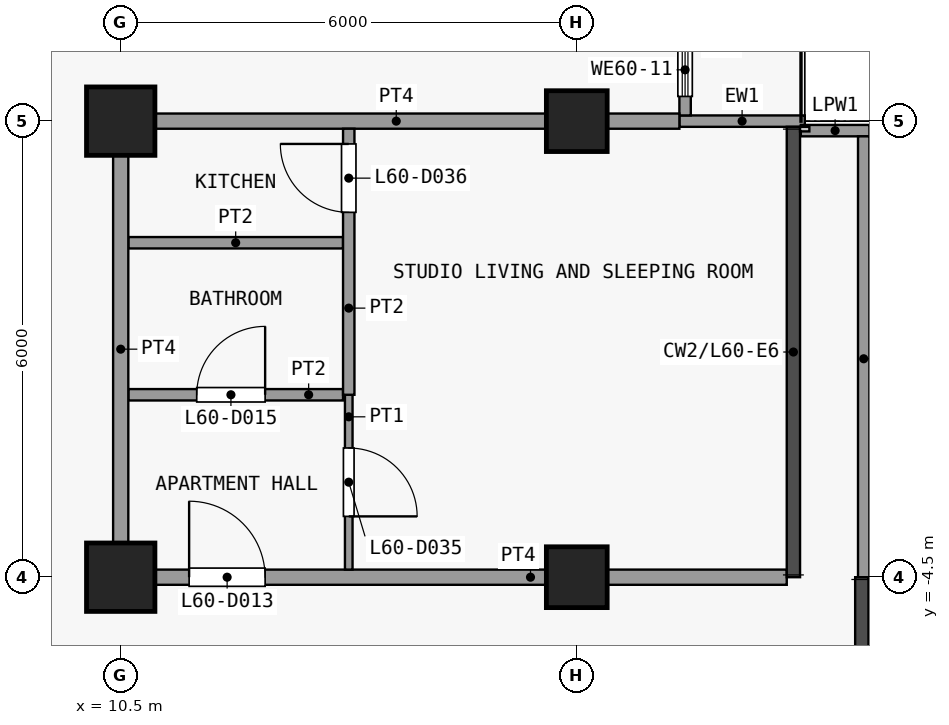
"""IFC4 building model, lengths in metres.
Left out: names, types, materials, properties, quantities, classifications, styles, units other than length and angle.
Written with IfcOpenShell. Run it as: python <this file> out.ifc"""

import sys

from ifc_helpers import new_model, si_unit, direction, frame, frame_2d, origin, origin_2d, place, context, subcontext, project, spatial, rectangle, extrude, element, fill, save


model = new_model("IFC4")
c1 = context("Model", 3, precision=1e-05, world=origin(), true_north=direction((0.0, 1.0)))
c2 = subcontext(c1, "Body", "Model", "MODEL_VIEW")
j1 = project(units=[si_unit("LENGTHUNIT", "METRE"), si_unit("PLANEANGLEUNIT", "RADIAN")], contexts=[c1])
p1 = place(None, origin())
s1 = spatial("IfcSite", under=j1, at=p1, CompositionType="ELEMENT")
p2 = place(p1, origin())
s2 = spatial("IfcBuilding", under=s1, at=p2, CompositionType="ELEMENT")
p3 = place(p2, frame((0.0, 0.0, 237.5)))
s3 = spatial("IfcBuildingStorey", under=s2, at=p3, CompositionType="ELEMENT", Elevation=237.5)
for number, where, z_axis, x_axis in (
    (1, (10.5, -4.5, 0.0), (0.0, 0.0, 1.0), (1.0, 0.0, 0.0)),
    (2, (10.5, 1.5, 0.0), (0.0, 0.0, 1.0), (1.0, 0.0, 0.0)),
):
    element("IfcColumn", number, at=place(p3, frame(where, z_axis=z_axis, x_axis=x_axis)), inside=s3, PredefinedType="COLUMN", context=c2, shape_type="SweptSolid", body=[
        extrude(rectangle(XDim=0.9, YDim=0.9, at=origin_2d()), origin(), (0.0, 0.0, 1.0), 3.6),
    ])
for number, where, z_axis, x_axis in (
    (3, (16.5, -4.5, 0.0), (0.0, 0.0, 1.0), (1.0, 0.0, 0.0)),
    (4, (16.5, 1.5, 0.0), (0.0, 0.0, 1.0), (1.0, 0.0, 0.0)),
):
    element("IfcColumn", number, at=place(p3, frame(where, z_axis=z_axis, x_axis=x_axis)), inside=s3, PredefinedType="COLUMN", context=c2, shape_type="SweptSolid", body=[
        extrude(rectangle(XDim=0.8, YDim=0.8, at=origin_2d()), origin(), (0.0, 0.0, 1.0), 3.6),
    ])
p4 = place(p3, frame((17.85, 1.5, 0.0), z_axis=(0.0, 0.0, 1.0), x_axis=(1.0, 0.0, 0.0)))
e5 = element("IfcWall", 5, at=p4, inside=s3, PredefinedType="SOLIDWALL", context=c2, shape_type="SweptSolid", body=[
    extrude(rectangle(XDim=1.65, YDim=0.15, at=frame_2d((0.825, 0.0))), origin(), (0.0, 0.0, 1.0), 3.3),
])
p5 = place(p3, frame((17.925, 7.425, 0.0), z_axis=(0.0, 0.0, 1.0), x_axis=(0.0, -1.0, 0.0)))
e6 = element("IfcWall", 6, at=p5, inside=s3, PredefinedType="SOLIDWALL", context=c2, shape_type="SweptSolid", body=[
    extrude(rectangle(XDim=5.85, YDim=0.15, at=frame_2d((2.925, 0.0))), origin(), (0.0, 0.0, 1.0), 3.3),
])
p6 = place(p5, frame((3.45, 0.0, 0.0)))
e7 = element("IfcOpeningElement", 7, at=p6, cuts=e6, PredefinedType="OPENING", context=c2, shape_type="SweptSolid", body=[
    extrude(rectangle(XDim=1.2, YDim=2.4, at=frame_2d((0.6, 1.2))), frame((0.0, 0.085, 0.0), z_axis=(0.0, -1.0, 0.0), x_axis=(1.0, 0.0, 0.0)), (0.0, 0.0, 1.0), 0.17),
])
p7 = place(p5, frame((4.9, 0.0, 0.9)))
e8 = element("IfcOpeningElement", 8, at=p7, cuts=e6, PredefinedType="OPENING", context=c2, shape_type="SweptSolid", body=[
    extrude(rectangle(XDim=0.7, YDim=2.1, at=frame_2d((0.35, 1.05))), frame((0.0, 0.085, 0.0), z_axis=(0.0, -1.0, 0.0), x_axis=(1.0, 0.0, 0.0)), (0.0, 0.0, 1.0), 0.17),
])
p8 = place(p5, frame((0.825, 0.0, 0.9)))
e9 = element("IfcOpeningElement", 9, at=p8, cuts=e6, PredefinedType="OPENING", context=c2, shape_type="SweptSolid", body=[
    extrude(rectangle(XDim=1.8, YDim=2.1, at=frame_2d((0.9, 1.05))), frame((0.0, 0.085, 0.0), z_axis=(0.0, -1.0, 0.0), x_axis=(1.0, 0.0, 0.0)), (0.0, 0.0, 1.0), 0.17),
])
p9 = place(p3, frame((19.448, 1.375, 0.0), z_axis=(0.0, 0.0, 1.0), x_axis=(1.0, 0.0, 0.0)))
e10 = element("IfcWall", 10, at=p9, inside=s3, PredefinedType="PARAPET", context=c2, shape_type="SweptSolid", body=[
    extrude(rectangle(XDim=0.903, YDim=0.15, at=frame_2d((0.451, 0.0))), origin(), (0.0, 0.0, 1.0), 1.15),
])
p10 = place(p3, frame((20.275, 1.3, 0.0), z_axis=(0.0, 0.0, 1.0), x_axis=(0.0, -1.0, 0.0)))
e11 = element("IfcWall", 11, at=p10, inside=s3, PredefinedType="PARAPET", context=c2, shape_type="SweptSolid", body=[
    extrude(rectangle(XDim=5.853, YDim=0.15, at=frame_2d((2.926, 0.0))), origin(), (0.0, 0.0, 1.0), 1.15),
])
p11 = place(p3, frame((10.4, -4.5, 0.0), z_axis=(0.0, 0.0, 1.0), x_axis=(1.0, 0.0, 0.0)))
e12 = element("IfcWall", 12, at=p11, inside=s3, PredefinedType="PARTITIONING", context=c2, shape_type="SweptSolid", body=[
    extrude(rectangle(XDim=8.863, YDim=0.2, at=frame_2d((4.431, 0.0))), origin(), (0.0, 0.0, 1.0), 3.3),
])
p12 = place(p11, frame((1.0, 0.0, 0.0)))
e13 = element("IfcOpeningElement", 13, at=p12, cuts=e12, PredefinedType="OPENING", context=c2, shape_type="SweptSolid", body=[
    extrude(rectangle(XDim=1.0, YDim=2.1, at=frame_2d((0.5, 1.05))), frame((0.0, 0.11, 0.0), z_axis=(0.0, -1.0, 0.0), x_axis=(1.0, 0.0, 0.0)), (0.0, 0.0, 1.0), 0.22),
])
p13 = place(p3, frame((10.6, -2.1, 0.0), z_axis=(0.0, 0.0, 1.0), x_axis=(1.0, 0.0, 0.0)))
e14 = element("IfcWall", 14, at=p13, inside=s3, PredefinedType="PARTITIONING", context=c2, shape_type="SweptSolid", body=[
    extrude(rectangle(XDim=2.825, YDim=0.15, at=frame_2d((1.413, 0.0))), origin(), (0.0, 0.0, 1.0), 3.3),
])
p14 = place(p13, frame((0.9, 0.0, 0.0)))
e15 = element("IfcOpeningElement", 15, at=p14, cuts=e14, PredefinedType="OPENING", context=c2, shape_type="SweptSolid", body=[
    extrude(rectangle(XDim=0.9, YDim=2.1, at=frame_2d((0.45, 1.05))), frame((0.0, 0.085, 0.0), z_axis=(0.0, -1.0, 0.0), x_axis=(1.0, 0.0, 0.0)), (0.0, 0.0, 1.0), 0.17),
])
p15 = place(p3, frame((10.6, -0.1, 0.0), z_axis=(0.0, 0.0, 1.0), x_axis=(1.0, 0.0, 0.0)))
e16 = element("IfcWall", 16, at=p15, inside=s3, PredefinedType="PARTITIONING", context=c2, shape_type="SweptSolid", body=[
    extrude(rectangle(XDim=2.825, YDim=0.15, at=frame_2d((1.413, 0.0))), origin(), (0.0, 0.0, 1.0), 3.3),
])
p16 = place(p3, frame((10.4, 1.5, 0.0), z_axis=(0.0, 0.0, 1.0), x_axis=(1.0, 0.0, 0.0)))
e17 = element("IfcWall", 17, at=p16, inside=s3, PredefinedType="PARTITIONING", context=c2, shape_type="SweptSolid", body=[
    extrude(rectangle(XDim=7.45, YDim=0.2, at=frame_2d((3.725, 0.0))), origin(), (0.0, 0.0, 1.0), 3.3),
])
p17 = place(p3, frame((10.5, -4.4, 0.0), z_axis=(0.0, 0.0, 1.0), x_axis=(0.0, 1.0, 0.0)))
e18 = element("IfcWall", 18, at=p17, inside=s3, PredefinedType="PARTITIONING", context=c2, shape_type="SweptSolid", body=[
    extrude(rectangle(XDim=5.8, YDim=0.2, at=frame_2d((2.9, 0.0))), origin(), (0.0, 0.0, 1.0), 3.3),
])
p18 = place(p3, frame((13.5, -4.4, 0.0), z_axis=(0.0, 0.0, 1.0), x_axis=(0.0, 1.0, 0.0)))
e19 = element("IfcWall", 19, at=p18, inside=s3, PredefinedType="PARTITIONING", context=c2, shape_type="SweptSolid", body=[
    extrude(rectangle(XDim=2.3, YDim=0.1, at=frame_2d((1.15, 0.0))), origin(), (0.0, 0.0, 1.0), 3.3),
])
p19 = place(p18, frame((0.7, 0.0, 0.0)))
e20 = element("IfcOpeningElement", 20, at=p19, cuts=e19, PredefinedType="OPENING", context=c2, shape_type="SweptSolid", body=[
    extrude(rectangle(XDim=0.9, YDim=2.1, at=frame_2d((0.45, 1.05))), frame((0.0, 0.06, 0.0), z_axis=(0.0, -1.0, 0.0), x_axis=(1.0, 0.0, 0.0)), (0.0, 0.0, 1.0), 0.12),
])
p20 = place(p3, frame((13.5, -2.1, 0.0), z_axis=(0.0, 0.0, 1.0), x_axis=(0.0, 1.0, 0.0)))
e21 = element("IfcWall", 21, at=p20, inside=s3, PredefinedType="PARTITIONING", context=c2, shape_type="SweptSolid", body=[
    extrude(rectangle(XDim=3.5, YDim=0.15, at=frame_2d((1.75, 0.0))), origin(), (0.0, 0.0, 1.0), 3.3),
])
p21 = place(p20, frame((2.4, 0.0, 0.0)))
e22 = element("IfcOpeningElement", 22, at=p21, cuts=e21, PredefinedType="OPENING", context=c2, shape_type="SweptSolid", body=[
    extrude(rectangle(XDim=0.9, YDim=2.1, at=frame_2d((0.45, 1.05))), frame((0.0, 0.085, 0.0), z_axis=(0.0, -1.0, 0.0), x_axis=(1.0, 0.0, 0.0)), (0.0, 0.0, 1.0), 0.17),
])
p22 = place(p7, origin())
e23 = element("IfcWindow", 23, at=p22, inside=s3, PartitioningType="SINGLE_PANEL", PredefinedType="WINDOW", context=c2, shape_type="SweptSolid", body=[
    extrude(rectangle(XDim=0.7, YDim=2.1, at=frame_2d((0.35, 1.05))), frame((0.0, 0.03, 0.0), z_axis=(0.0, -1.0, 0.0), x_axis=(1.0, 0.0, 0.0)), (0.0, 0.0, 1.0), 0.06),
])
fill(e8, e23)
p23 = place(p12, origin())
e24 = element("IfcDoor", 24, at=p23, inside=s3, OperationType="SINGLE_SWING_RIGHT", PredefinedType="DOOR", context=c2, shape_type="SweptSolid", body=[
    extrude(rectangle(XDim=1.0, YDim=2.1, at=frame_2d((0.5, 1.05))), frame((0.0, 0.025, 0.0), z_axis=(0.0, -1.0, 0.0), x_axis=(1.0, 0.0, 0.0)), (0.0, 0.0, 1.0), 0.05),
])
fill(e13, e24)
p24 = place(p14, origin())
e25 = element("IfcDoor", 25, at=p24, inside=s3, OperationType="SINGLE_SWING_LEFT", PredefinedType="DOOR", context=c2, shape_type="SweptSolid", body=[
    extrude(rectangle(XDim=0.9, YDim=2.1, at=frame_2d((0.45, 1.05))), frame((0.0, 0.025, 0.0), z_axis=(0.0, -1.0, 0.0), x_axis=(1.0, 0.0, 0.0)), (0.0, 0.0, 1.0), 0.05),
])
fill(e15, e25)
p25 = place(p19, origin())
e26 = element("IfcDoor", 26, at=p25, inside=s3, OperationType="SINGLE_SWING_LEFT", PredefinedType="DOOR", context=c2, shape_type="SweptSolid", body=[
    extrude(rectangle(XDim=0.9, YDim=2.1, at=frame_2d((0.45, 1.05))), frame((0.0, 0.025, 0.0), z_axis=(0.0, -1.0, 0.0), x_axis=(1.0, 0.0, 0.0)), (0.0, 0.0, 1.0), 0.05),
])
fill(e20, e26)
p26 = place(p21, origin())
e27 = element("IfcDoor", 27, at=p26, inside=s3, OperationType="SINGLE_SWING_LEFT", PredefinedType="DOOR", context=c2, shape_type="SweptSolid", body=[
    extrude(rectangle(XDim=0.9, YDim=2.1, at=frame_2d((0.45, 1.05))), frame((0.0, 0.025, 0.0), z_axis=(0.0, -1.0, 0.0), x_axis=(1.0, 0.0, 0.0)), (0.0, 0.0, 1.0), 0.05),
])
fill(e22, e27)
save(model, sys.argv[1])
